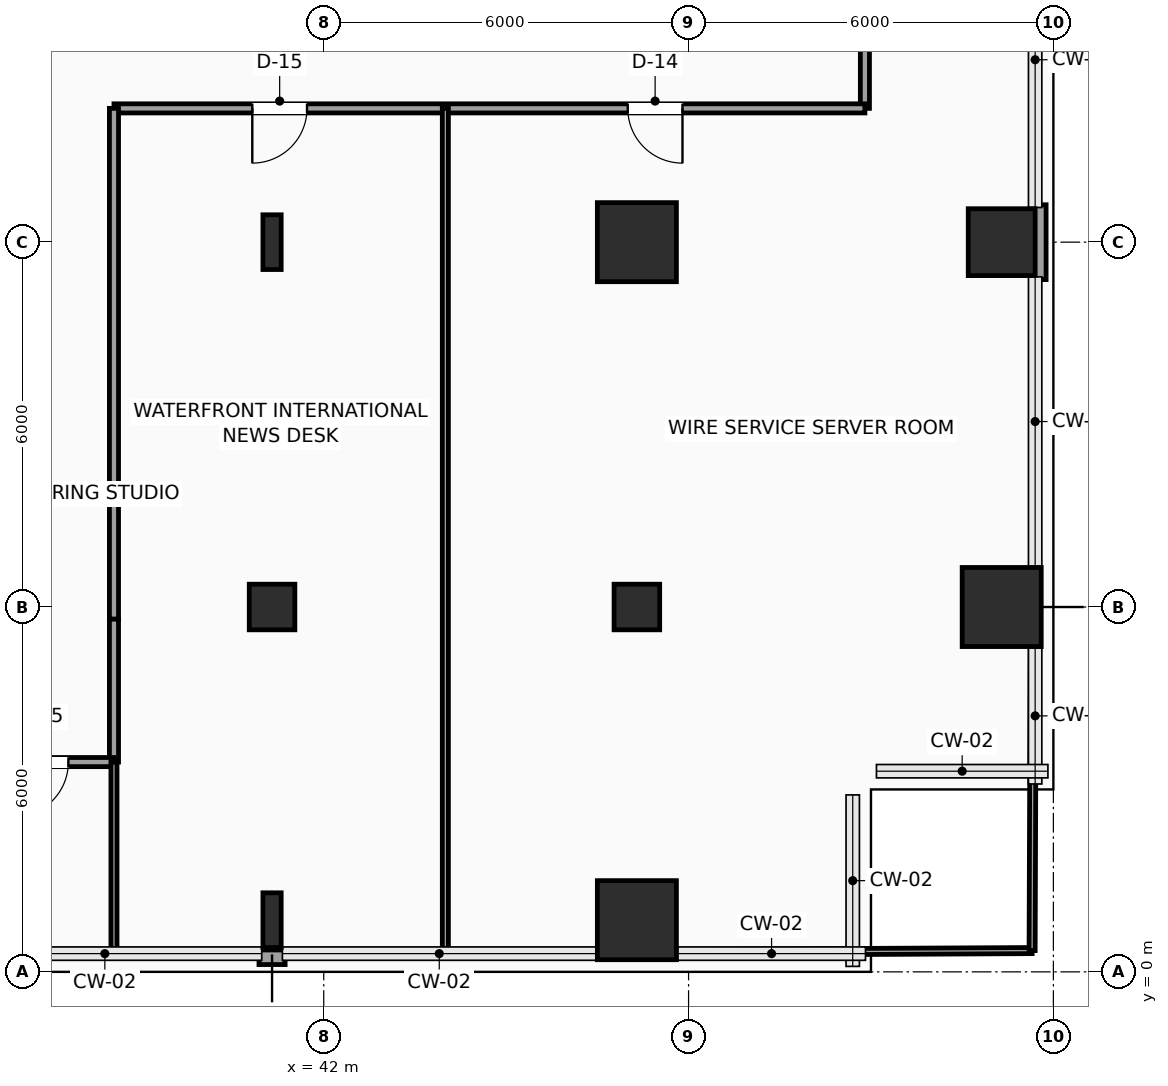
"""IFC4 building model, lengths in metres.
Left out: names, types, materials, properties, quantities, classifications, styles, units other than length and angle.
Written with IfcOpenShell. Run it as: python <this file> out.ifc"""

import sys

from ifc_helpers import new_model, si_unit, direction, frame, frame_2d, origin, origin_2d, place, context, subcontext, project, spatial, rectangle, hollow_rectangle, i_section, extrude, element, fill, save


model = new_model("IFC4")
c1 = context("Model", 3, precision=1e-05, world=origin(), true_north=direction((0.0, 1.0)))
c2 = subcontext(c1, "Body", "Model", "MODEL_VIEW")
j1 = project(units=[si_unit("LENGTHUNIT", "METRE"), si_unit("PLANEANGLEUNIT", "RADIAN")], contexts=[c1])
p1 = place(None, origin())
s1 = spatial("IfcSite", under=j1, at=p1, CompositionType="ELEMENT")
p2 = place(p1, origin())
s2 = spatial("IfcBuilding", under=s1, at=p2, CompositionType="ELEMENT")
p3 = place(p2, frame((0.0, 0.0, 32.4)))
s3 = spatial("IfcBuildingStorey", under=s2, at=p3, CompositionType="ELEMENT", Elevation=32.4)
p4 = place(p3, frame((41.15, 0.85, 0.0), z_axis=(0.0, 0.0, 1.0), x_axis=(1.0, 0.0, 0.0)))
e1 = element("IfcColumn", 1, at=p4, inside=s3, PredefinedType="COLUMN", context=c2, shape_type="SweptSolid", body=[
    extrude(i_section(OverallWidth=0.3, OverallDepth=0.9, WebThickness=0.019, FlangeThickness=0.035, FilletRadius=0.03, at=origin_2d()), origin(), (0.0, 0.0, 1.0), 3.9),
])
p5 = place(p3, frame((41.15, 6.0, 0.0), z_axis=(0.0, 0.0, 1.0), x_axis=(1.0, 0.0, 0.0)))
e2 = element("IfcColumn", 2, at=p5, inside=s3, PredefinedType="COLUMN", context=c2, shape_type="SweptSolid", body=[
    extrude(hollow_rectangle(XDim=0.75, YDim=0.75, WallThickness=0.035, InnerFilletRadius=0.035, OuterFilletRadius=0.05, at=origin_2d()), origin(), (0.0, 0.0, 1.0), 3.9),
])
p6 = place(p3, frame((41.15, 12.0, 0.0), z_axis=(0.0, 0.0, 1.0), x_axis=(1.0, 0.0, 0.0)))
e3 = element("IfcColumn", 3, at=p6, inside=s3, PredefinedType="COLUMN", context=c2, shape_type="SweptSolid", body=[
    extrude(i_section(OverallWidth=0.3, OverallDepth=0.9, WebThickness=0.019, FlangeThickness=0.035, FilletRadius=0.03, at=origin_2d()), origin(), (0.0, 0.0, 1.0), 3.9),
])
p7 = place(p3, frame((47.15, 0.85, 0.0), z_axis=(0.0, 0.0, 1.0), x_axis=(1.0, 0.0, 0.0)))
e4 = element("IfcColumn", 4, at=p7, inside=s3, PredefinedType="COLUMN", context=c2, shape_type="SweptSolid", body=[
    extrude(rectangle(XDim=1.3, YDim=1.3, at=origin_2d()), origin(), (0.0, 0.0, 1.0), 3.9),
])
p8 = place(p3, frame((47.15, 6.0, 0.0), z_axis=(0.0, 0.0, 1.0), x_axis=(1.0, 0.0, 0.0)))
e5 = element("IfcColumn", 5, at=p8, inside=s3, PredefinedType="COLUMN", context=c2, shape_type="SweptSolid", body=[
    extrude(hollow_rectangle(XDim=0.75, YDim=0.75, WallThickness=0.035, InnerFilletRadius=0.035, OuterFilletRadius=0.05, at=origin_2d()), origin(), (0.0, 0.0, 1.0), 3.9),
])
for number, where, z_axis, x_axis in (
    (6, (47.15, 12.0, 0.0), (0.0, 0.0, 1.0), (1.0, 0.0, 0.0)),
    (7, (53.15, 6.0, 0.0), (0.0, 0.0, 1.0), (1.0, 0.0, 0.0)),
):
    element("IfcColumn", number, at=place(p3, frame(where, z_axis=z_axis, x_axis=x_axis)), inside=s3, PredefinedType="COLUMN", context=c2, shape_type="SweptSolid", body=[
        extrude(rectangle(XDim=1.3, YDim=1.3, at=origin_2d()), origin(), (0.0, 0.0, 1.0), 3.9),
    ])
p9 = place(p3, frame((53.15, 12.0, 0.0), z_axis=(0.0, 0.0, 1.0), x_axis=(1.0, 0.0, 0.0)))
e8 = element("IfcColumn", 8, at=p9, inside=s3, PredefinedType="COLUMN", context=c2, shape_type="SweptSolid", body=[
    extrude(rectangle(XDim=1.1, YDim=1.1, at=origin_2d()), origin(), (0.0, 0.0, 1.0), 3.9),
])
p10 = place(p3, frame((53.76, 12.615, 0.0), z_axis=(0.0, 0.0, 1.0), x_axis=(0.0, -1.0, 0.0)))
e9 = element("IfcWall", 9, at=p10, inside=s3, PredefinedType="SOLIDWALL", context=c2, shape_type="SweptSolid", body=[
    extrude(rectangle(XDim=1.23, YDim=0.24, at=frame_2d((0.615, 0.0))), origin(), (0.0, 0.0, 1.0), 3.65),
])
p11 = place(p3, frame((41.365, 0.24, 0.0), z_axis=(0.0, 0.0, 1.0), x_axis=(-1.0, 0.0, 0.0)))
e10 = element("IfcWall", 10, at=p11, inside=s3, PredefinedType="SOLIDWALL", context=c2, shape_type="SweptSolid", body=[
    extrude(rectangle(XDim=0.43, YDim=0.24, at=frame_2d((0.215, 0.0))), origin(), (0.0, 0.0, 1.0), 3.65),
])
p12 = place(p3, frame((50.9, 16.55, 0.0), z_axis=(0.0, 0.0, 1.0), x_axis=(0.0, -1.0, 0.0)))
e11 = element("IfcWall", 11, at=p12, inside=s3, PredefinedType="PARTITIONING", context=c2, shape_type="SweptSolid", body=[
    extrude(rectangle(XDim=2.35, YDim=0.15, at=frame_2d((1.175, 0.0))), origin(), (0.0, 0.0, 1.0), 3.65),
])
p13 = place(p3, frame((50.9, 14.2, 0.0), z_axis=(0.0, 0.0, 1.0), x_axis=(-1.0, 0.0, 0.0)))
e12 = element("IfcWall", 12, at=p13, inside=s3, PredefinedType="PARTITIONING", context=c2, shape_type="SweptSolid", body=[
    extrude(rectangle(XDim=12.35, YDim=0.15, at=frame_2d((6.175, 0.0))), origin(), (0.0, 0.0, 1.0), 3.65),
])
p14 = place(p13, frame((9.175, 0.0, 0.0)))
e13 = element("IfcOpeningElement", 13, at=p14, cuts=e12, PredefinedType="OPENING", context=c2, shape_type="SweptSolid", body=[
    extrude(rectangle(XDim=0.9, YDim=2.1, at=frame_2d((0.45, 1.05))), frame((0.0, 0.085, 0.0), z_axis=(0.0, -1.0, 0.0), x_axis=(1.0, 0.0, 0.0)), (0.0, 0.0, 1.0), 0.17),
])
p15 = place(p13, frame((3.0, 0.0, 0.0)))
e14 = element("IfcOpeningElement", 14, at=p15, cuts=e12, PredefinedType="OPENING", context=c2, shape_type="SweptSolid", body=[
    extrude(rectangle(XDim=0.9, YDim=2.1, at=frame_2d((0.45, 1.05))), frame((0.0, 0.085, 0.0), z_axis=(0.0, -1.0, 0.0), x_axis=(1.0, 0.0, 0.0)), (0.0, 0.0, 1.0), 0.17),
])
p16 = place(p3, frame((38.55, 14.2, 0.0), z_axis=(0.0, 0.0, 1.0), x_axis=(0.0, -1.0, 0.0)))
e15 = element("IfcWall", 15, at=p16, inside=s3, PredefinedType="PARTITIONING", context=c2, shape_type="SweptSolid", body=[
    extrude(rectangle(XDim=8.4, YDim=0.15, at=frame_2d((4.2, 0.0))), origin(), (0.0, 0.0, 1.0), 3.65),
])
p17 = place(p3, frame((38.55, 5.8, 0.0), z_axis=(0.0, 0.0, 1.0), x_axis=(0.0, -1.0, 0.0)))
e16 = element("IfcWall", 16, at=p17, inside=s3, PredefinedType="PARTITIONING", context=c2, shape_type="SweptSolid", body=[
    extrude(rectangle(XDim=2.35, YDim=0.15, at=frame_2d((1.175, 0.0))), origin(), (0.0, 0.0, 1.0), 3.65),
])
p18 = place(p3, frame((38.55, 3.45, 0.0), z_axis=(0.0, 0.0, 1.0), x_axis=(-1.0, 0.0, 0.0)))
e17 = element("IfcWall", 17, at=p18, inside=s3, PredefinedType="PARTITIONING", context=c2, shape_type="SweptSolid", body=[
    extrude(rectangle(XDim=2.4, YDim=0.15, at=frame_2d((1.2, 0.0))), origin(), (0.0, 0.0, 1.0), 3.142),
])
p19 = place(p18, frame((0.75, 0.0, 0.0)))
e18 = element("IfcOpeningElement", 18, at=p19, cuts=e17, PredefinedType="OPENING", context=c2, shape_type="SweptSolid", body=[
    extrude(rectangle(XDim=0.9, YDim=2.1, at=frame_2d((0.45, 1.05))), frame((0.0, 0.085, 0.0), z_axis=(0.0, -1.0, 0.0), x_axis=(1.0, 0.0, 0.0)), (0.0, 0.0, 1.0), 0.17),
])
p20 = place(p3, frame((44.0, 0.3, 0.0), z_axis=(0.0, 0.0, 1.0), x_axis=(0.0, 1.0, 0.0)))
e19 = element("IfcWall", 19, at=p20, inside=s3, PredefinedType="PARTITIONING", context=c2, shape_type="SweptSolid", body=[
    extrude(rectangle(XDim=13.9, YDim=0.1, at=frame_2d((6.95, 0.0))), origin(), (0.0, 0.0, 1.0), 3.65),
])
p21 = place(p3, frame((44.0, 0.3, 0.0), z_axis=(0.0, 0.0, 1.0), x_axis=(0.99998655059, 0.005186389791, 0.0)))
e20 = element("IfcWall", 20, at=p21, inside=s3, PredefinedType="PARTITIONING", context=c2, shape_type="SweptSolid", body=[
    extrude(rectangle(XDim=9.65, YDim=0.1, at=frame_2d((4.825, 0.0))), origin(), (0.0, 0.0, 1.0), 3.65),
])
p22 = place(p3, frame((53.65, 0.35, 0.0), z_axis=(0.0, 0.0, 1.0), x_axis=(0.003606251025, 0.999993497456, 0.0)))
e21 = element("IfcWall", 21, at=p22, inside=s3, PredefinedType="PARTITIONING", context=c2, shape_type="SweptSolid", body=[
    extrude(rectangle(XDim=11.035, YDim=0.1, at=frame_2d((5.518, 0.0))), origin(), (0.0, 0.0, 1.0), 3.65),
])
p23 = place(p3, frame((53.694, 12.615, 0.0), z_axis=(0.0, 0.0, 1.0), x_axis=(0.003542799701, 0.999993724265, 0.0)))
e22 = element("IfcWall", 22, at=p23, inside=s3, PredefinedType="PARTITIONING", context=c2, shape_type="SweptSolid", body=[
    extrude(rectangle(XDim=1.585, YDim=0.1, at=frame_2d((0.792, 0.0))), origin(), (0.0, 0.0, 1.0), 3.65),
])
p24 = place(p3, frame((38.55, 0.3, 0.0), z_axis=(0.0, 0.0, 1.0), x_axis=(0.0, 1.0, 0.0)))
e23 = element("IfcWall", 23, at=p24, inside=s3, PredefinedType="PARTITIONING", context=c2, shape_type="SweptSolid", body=[
    extrude(rectangle(XDim=3.15, YDim=0.1, at=frame_2d((1.575, 0.0))), origin(), (0.0, 0.0, 1.0), 3.65),
])
p25 = place(p14, origin())
e24 = element("IfcDoor", 24, at=p25, inside=s3, OperationType="SINGLE_SWING_RIGHT", PredefinedType="DOOR", context=c2, shape_type="SweptSolid", body=[
    extrude(rectangle(XDim=0.9, YDim=2.1, at=frame_2d((0.45, 1.05))), frame((0.0, 0.025, 0.0), z_axis=(0.0, -1.0, 0.0), x_axis=(1.0, 0.0, 0.0)), (0.0, 0.0, 1.0), 0.05),
])
fill(e13, e24)
p26 = place(p15, origin())
e25 = element("IfcDoor", 25, at=p26, inside=s3, OperationType="SINGLE_SWING_LEFT", PredefinedType="DOOR", context=c2, shape_type="SweptSolid", body=[
    extrude(rectangle(XDim=0.9, YDim=2.1, at=frame_2d((0.45, 1.05))), frame((0.0, 0.025, 0.0), z_axis=(0.0, -1.0, 0.0), x_axis=(1.0, 0.0, 0.0)), (0.0, 0.0, 1.0), 0.05),
])
fill(e14, e25)
p27 = place(p19, origin())
e26 = element("IfcDoor", 26, at=p27, inside=s3, OperationType="SINGLE_SWING_RIGHT", PredefinedType="DOOR", context=c2, shape_type="SweptSolid", body=[
    extrude(rectangle(XDim=0.9, YDim=2.1, at=frame_2d((0.45, 1.05))), frame((0.0, 0.025, 0.0), z_axis=(0.0, -1.0, 0.0), x_axis=(1.0, 0.0, 0.0)), (0.0, 0.0, 1.0), 0.05),
])
fill(e18, e26)
save(model, sys.argv[1])
